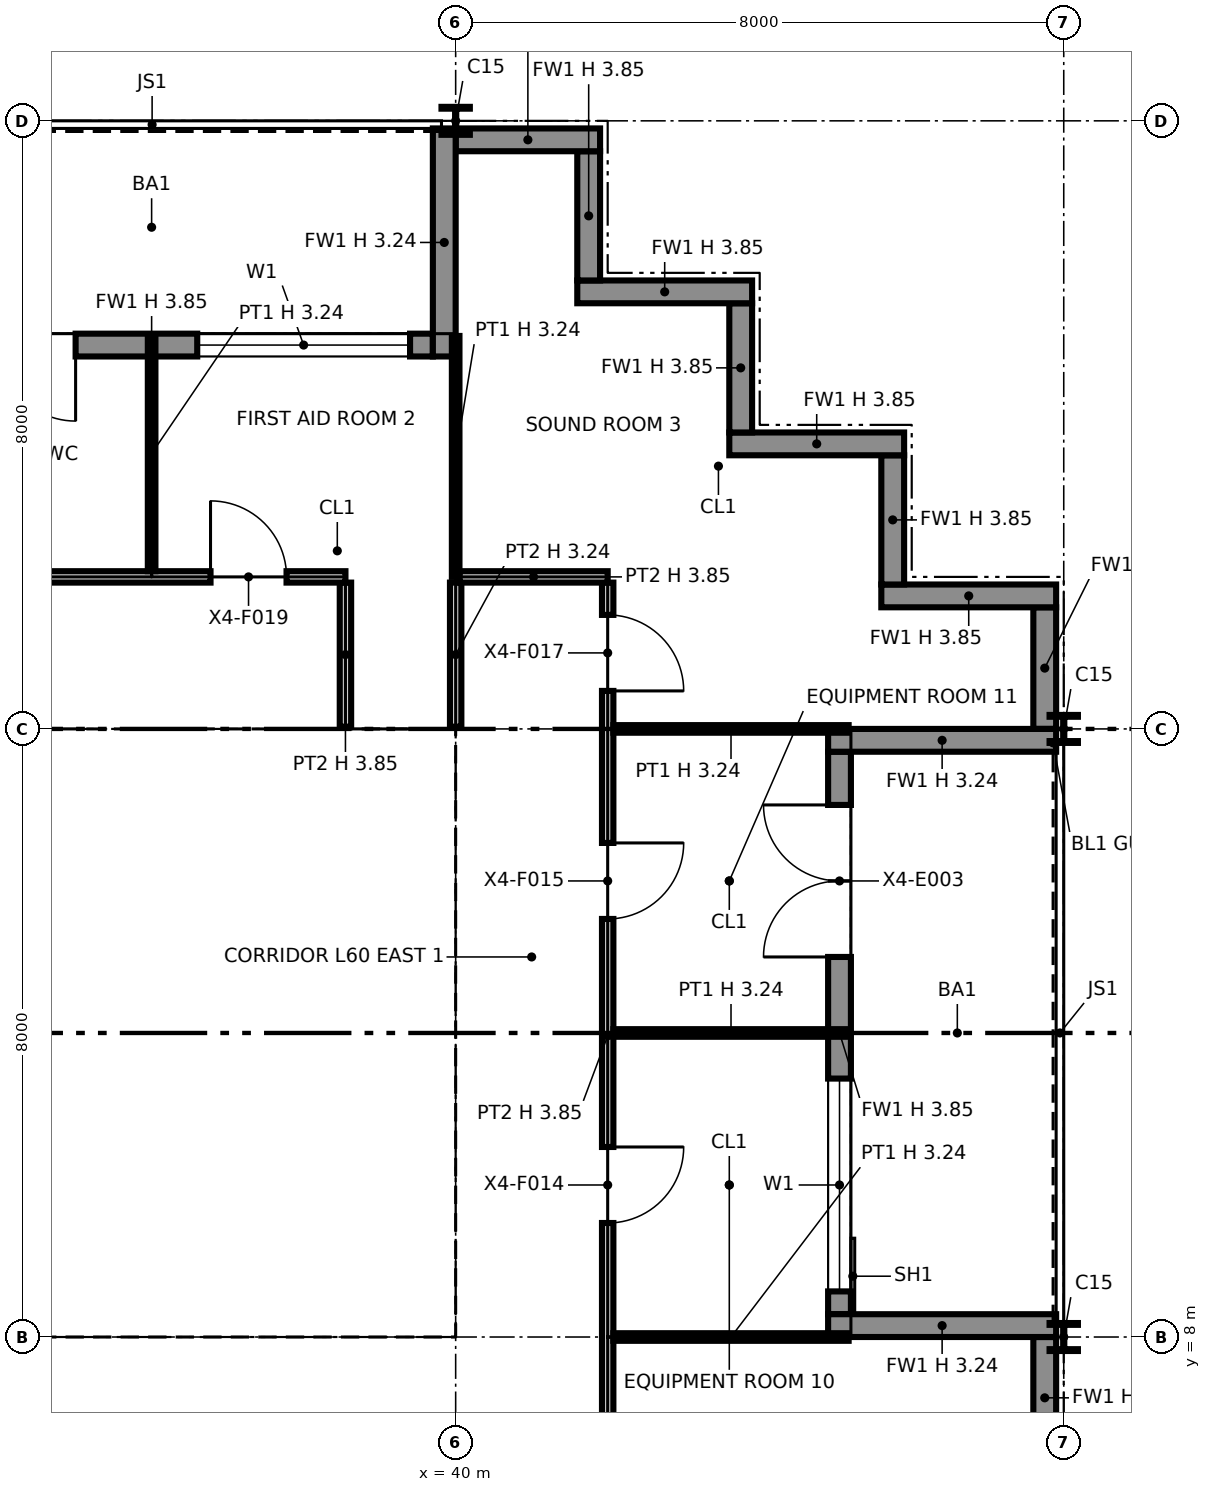
"""IFC4 building model, lengths in metres.
Left out: names, types, materials, properties, quantities, classifications, styles, units other than length and angle.
Written with IfcOpenShell. Run it as: python <this file> out.ifc"""

import sys

from ifc_helpers import new_model, si_unit, direction, frame, frame_2d, origin, origin_2d, place, context, subcontext, project, spatial, polyline, rectangle, i_section, outline, extrude, element, fill, save


model = new_model("IFC4")
c1 = context("Model", 3, precision=1e-05, world=origin(), true_north=direction((0.0, 1.0)))
c2 = subcontext(c1, "Body", "Model", "MODEL_VIEW")
j1 = project(units=[si_unit("LENGTHUNIT", "METRE"), si_unit("PLANEANGLEUNIT", "RADIAN")], contexts=[c1])
p1 = place(None, origin())
s1 = spatial("IfcSite", under=j1, at=p1, CompositionType="ELEMENT")
p2 = place(p1, origin())
s2 = spatial("IfcBuilding", under=s1, at=p2, CompositionType="ELEMENT")
p3 = place(p2, frame((0.0, 0.0, 275.0)))
s3 = spatial("IfcBuildingStorey", under=s2, at=p3, CompositionType="ELEMENT", Elevation=275.0)
for number, where, z_axis, x_axis in (
    (1, (40.0, 8.0, 0.0), (0.0, 0.0, 1.0), (1.0, 0.0, 0.0)),
    (2, (40.0, 16.0, 0.0), (0.0, 0.0, 1.0), (1.0, 0.0, 0.0)),
):
    element("IfcColumn", number, at=place(p3, frame(where, z_axis=z_axis, x_axis=x_axis)), inside=s3, PredefinedType="COLUMN", context=c2, shape_type="SweptSolid", body=[
        extrude(i_section(OverallWidth=0.257, OverallDepth=0.363, WebThickness=0.013, FlangeThickness=0.022, at=origin_2d()), origin(), (0.0, 0.0, 1.0), 3.85),
    ])
for number, where, z_axis, x_axis in (
    (3, (40.0, 24.0, 0.0), (0.0, 0.0, 1.0), (1.0, 0.0, 0.0)),
    (4, (48.0, 8.0, 0.0), (0.0, 0.0, 1.0), (1.0, 0.0, 0.0)),
    (5, (48.0, 16.0, 0.0), (0.0, 0.0, 1.0), (1.0, 0.0, 0.0)),
):
    element("IfcColumn", number, at=place(p3, frame(where, z_axis=z_axis, x_axis=x_axis)), inside=s3, PredefinedType="COLUMN", context=c2, shape_type="SweptSolid", body=[
        extrude(i_section(OverallWidth=0.373, OverallDepth=0.368, WebThickness=0.015, FlangeThickness=0.024, at=origin_2d()), origin(), (0.0, 0.0, 1.0), 3.85),
    ])
p4 = place(p3, frame((47.75, 6.4, 0.0), z_axis=(0.0, 0.0, 1.0), x_axis=(0.0, 1.0, 0.0)))
e6 = element("IfcWall", 6, at=p4, inside=s3, PredefinedType="SOLIDWALL", context=c2, shape_type="SweptSolid", body=[
    extrude(rectangle(XDim=1.6, YDim=0.3, at=frame_2d((0.8, 0.0))), origin(), (0.0, 0.0, 1.0), 3.85),
])
p5 = place(p3, frame((45.05, 8.3, 0.0), z_axis=(0.0, 0.0, 1.0), x_axis=(0.0, 1.0, 0.0)))
e7 = element("IfcWall", 7, at=p5, inside=s3, PredefinedType="SOLIDWALL", context=c2, shape_type="SweptSolid", body=[
    extrude(rectangle(XDim=7.4, YDim=0.3, at=frame_2d((3.7, 0.0))), origin(), (0.0, 0.0, 1.0), 3.85),
])
p6 = place(p5, frame((0.3, 0.0, 0.9)))
e8 = element("IfcOpeningElement", 8, at=p6, cuts=e7, PredefinedType="OPENING", context=c2, shape_type="SweptSolid", body=[
    extrude(rectangle(XDim=2.8, YDim=2.2, at=frame_2d((1.4, 1.1))), frame((0.0, 0.16, 0.0), z_axis=(0.0, -1.0, 0.0), x_axis=(1.0, 0.0, 0.0)), (0.0, 0.0, 1.0), 0.32),
])
p7 = place(p5, frame((4.7, 0.0, 0.0)))
e9 = element("IfcOpeningElement", 9, at=p7, cuts=e7, PredefinedType="OPENING", context=c2, shape_type="SweptSolid", body=[
    extrude(rectangle(XDim=2.0, YDim=2.4, at=frame_2d((1.0, 1.2))), frame((0.0, 0.16, 0.0), z_axis=(0.0, -1.0, 0.0), x_axis=(1.0, 0.0, 0.0)), (0.0, 0.0, 1.0), 0.32),
])
for number, where, z_axis, x_axis in (
    (10, (47.9, 8.15, 0.0), (0.0, 0.0, 1.0), (-1.0, 0.0, 0.0)),
    (11, (47.9, 15.85, 0.0), (0.0, 0.0, 1.0), (-1.0, 0.0, 0.0)),
):
    element("IfcWall", number, at=place(p3, frame(where, z_axis=z_axis, x_axis=x_axis)), inside=s3, PredefinedType="SOLIDWALL", context=c2, shape_type="SweptSolid", body=[
        extrude(rectangle(XDim=3.0, YDim=0.3, at=frame_2d((1.5, 0.0))), origin(), (0.0, 0.0, 1.0), 3.237),
    ])
p8 = place(p3, frame((47.75, 16.0, 0.0), z_axis=(0.0, 0.0, 1.0), x_axis=(0.0, 1.0, 0.0)))
e12 = element("IfcWall", 12, at=p8, inside=s3, PredefinedType="SOLIDWALL", context=c2, shape_type="SweptSolid", body=[
    extrude(rectangle(XDim=1.6, YDim=0.3, at=frame_2d((0.8, 0.0))), origin(), (0.0, 0.0, 1.0), 3.85),
])
p9 = place(p3, frame((47.9, 17.75, 0.0), z_axis=(0.0, 0.0, 1.0), x_axis=(-1.0, 0.0, 0.0)))
e13 = element("IfcWall", 13, at=p9, inside=s3, PredefinedType="SOLIDWALL", context=c2, shape_type="SweptSolid", body=[
    extrude(rectangle(XDim=2.3, YDim=0.3, at=frame_2d((1.15, 0.0))), origin(), (0.0, 0.0, 1.0), 3.85),
])
p10 = place(p3, frame((45.75, 17.9, 0.0), z_axis=(0.0, 0.0, 1.0), x_axis=(0.0, 1.0, 0.0)))
e14 = element("IfcWall", 14, at=p10, inside=s3, PredefinedType="SOLIDWALL", context=c2, shape_type="SweptSolid", body=[
    extrude(rectangle(XDim=1.7, YDim=0.3, at=frame_2d((0.85, 0.0))), origin(), (0.0, 0.0, 1.0), 3.85),
])
p11 = place(p3, frame((45.9, 19.75, 0.0), z_axis=(0.0, 0.0, 1.0), x_axis=(-1.0, 0.0, 0.0)))
e15 = element("IfcWall", 15, at=p11, inside=s3, PredefinedType="SOLIDWALL", context=c2, shape_type="SweptSolid", body=[
    extrude(rectangle(XDim=2.3, YDim=0.3, at=frame_2d((1.15, 0.0))), origin(), (0.0, 0.0, 1.0), 3.85),
])
p12 = place(p3, frame((43.75, 19.9, 0.0), z_axis=(0.0, 0.0, 1.0), x_axis=(0.0, 1.0, 0.0)))
e16 = element("IfcWall", 16, at=p12, inside=s3, PredefinedType="SOLIDWALL", context=c2, shape_type="SweptSolid", body=[
    extrude(rectangle(XDim=1.7, YDim=0.3, at=frame_2d((0.85, 0.0))), origin(), (0.0, 0.0, 1.0), 3.85),
])
p13 = place(p3, frame((43.9, 21.75, 0.0), z_axis=(0.0, 0.0, 1.0), x_axis=(-1.0, 0.0, 0.0)))
e17 = element("IfcWall", 17, at=p13, inside=s3, PredefinedType="SOLIDWALL", context=c2, shape_type="SweptSolid", body=[
    extrude(rectangle(XDim=2.3, YDim=0.3, at=frame_2d((1.15, 0.0))), origin(), (0.0, 0.0, 1.0), 3.85),
])
p14 = place(p3, frame((41.75, 21.9, 0.0), z_axis=(0.0, 0.0, 1.0), x_axis=(0.0, 1.0, 0.0)))
e18 = element("IfcWall", 18, at=p14, inside=s3, PredefinedType="SOLIDWALL", context=c2, shape_type="SweptSolid", body=[
    extrude(rectangle(XDim=1.7, YDim=0.3, at=frame_2d((0.85, 0.0))), origin(), (0.0, 0.0, 1.0), 3.85),
])
p15 = place(p3, frame((41.9, 23.75, 0.0), z_axis=(0.0, 0.0, 1.0), x_axis=(-1.0, 0.0, 0.0)))
e19 = element("IfcWall", 19, at=p15, inside=s3, PredefinedType="SOLIDWALL", context=c2, shape_type="SweptSolid", body=[
    extrude(rectangle(XDim=1.9, YDim=0.3, at=frame_2d((0.95, 0.0))), origin(), (0.0, 0.0, 1.0), 3.85),
])
p16 = place(p3, frame((39.7, 21.05, 0.0), z_axis=(0.0, 0.0, 1.0), x_axis=(-1.0, 0.0, 0.0)))
e20 = element("IfcWall", 20, at=p16, inside=s3, PredefinedType="SOLIDWALL", context=c2, shape_type="SweptSolid", body=[
    extrude(rectangle(XDim=7.4, YDim=0.3, at=frame_2d((3.7, 0.0))), origin(), (0.0, 0.0, 1.0), 3.85),
])
p17 = place(p16, frame((0.3, 0.0, 0.9)))
e21 = element("IfcOpeningElement", 21, at=p17, cuts=e20, PredefinedType="OPENING", context=c2, shape_type="SweptSolid", body=[
    extrude(rectangle(XDim=2.8, YDim=2.2, at=frame_2d((1.4, 1.1))), frame((0.0, 0.16, 0.0), z_axis=(0.0, -1.0, 0.0), x_axis=(1.0, 0.0, 0.0)), (0.0, 0.0, 1.0), 0.32),
])
p18 = place(p16, frame((4.7, 0.0, 0.0)))
e22 = element("IfcOpeningElement", 22, at=p18, cuts=e20, PredefinedType="OPENING", context=c2, shape_type="SweptSolid", body=[
    extrude(rectangle(XDim=2.0, YDim=2.4, at=frame_2d((1.0, 1.2))), frame((0.0, 0.16, 0.0), z_axis=(0.0, -1.0, 0.0), x_axis=(1.0, 0.0, 0.0)), (0.0, 0.0, 1.0), 0.32),
])
p19 = place(p3, frame((39.85, 23.9, 0.0), z_axis=(0.0, 0.0, 1.0), x_axis=(0.0, -1.0, 0.0)))
e23 = element("IfcWall", 23, at=p19, inside=s3, PredefinedType="SOLIDWALL", context=c2, shape_type="SweptSolid", body=[
    extrude(rectangle(XDim=3.0, YDim=0.3, at=frame_2d((1.5, 0.0))), origin(), (0.0, 0.0, 1.0), 3.237),
])
p20 = place(p3, frame((24.65, 8.75, 0.0), z_axis=(0.0, 0.0, 1.0), x_axis=(1.0, 0.0, 0.0)))
e24 = element("IfcWall", 24, at=p20, inside=s3, PredefinedType="PARTITIONING", context=c2, shape_type="SweptSolid", body=[
    extrude(outline(polyline([(0.0, 0.0), (14.7, 0.0), (14.7, 3.85), (7.438, 3.85), (7.437, 3.318), (7.263, 3.318), (7.262, 3.85), (0.0, 3.85), (0.0, 0.0)])), frame((0.0, 0.1, 0.0), z_axis=(0.0, -1.0, 0.0), x_axis=(1.0, 0.0, 0.0)), (0.0, 0.0, 1.0), 0.2),
])
p21 = place(p3, frame((24.65, 15.25, 0.0), z_axis=(0.0, 0.0, 1.0), x_axis=(1.0, 0.0, 0.0)))
e25 = element("IfcWall", 25, at=p21, inside=s3, PredefinedType="PARTITIONING", context=c2, shape_type="SweptSolid", body=[
    extrude(outline(polyline([(0.0, 0.0), (14.7, 0.0), (14.7, 3.85), (7.438, 3.85), (7.437, 3.318), (7.263, 3.318), (7.262, 3.85), (0.0, 3.85), (0.0, 0.0)])), frame((0.0, 0.1, 0.0), z_axis=(0.0, -1.0, 0.0), x_axis=(1.0, 0.0, 0.0)), (0.0, 0.0, 1.0), 0.2),
])
p22 = place(p21, frame((2.85, 0.0, 0.0)))
e26 = element("IfcOpeningElement", 26, at=p22, cuts=e25, PredefinedType="OPENING", context=c2, shape_type="SweptSolid", body=[
    extrude(rectangle(XDim=1.8, YDim=2.1, at=frame_2d((0.9, 1.05))), frame((0.0, 0.11, 0.0), z_axis=(0.0, -1.0, 0.0), x_axis=(1.0, 0.0, 0.0)), (0.0, 0.0, 1.0), 0.22),
])
p23 = place(p21, frame((9.95, 0.0, 0.0), z_axis=(0.0, 0.0, 1.0), x_axis=(-1.0, 0.0, 0.0)))
e27 = element("IfcOpeningElement", 27, at=p23, cuts=e25, PredefinedType="OPENING", context=c2, shape_type="SweptSolid", body=[
    extrude(rectangle(XDim=1.4, YDim=2.1, at=frame_2d((0.7, 1.05))), frame((0.0, 0.11, 0.0), z_axis=(0.0, -1.0, 0.0), x_axis=(1.0, 0.0, 0.0)), (0.0, 0.0, 1.0), 0.22),
])
p24 = place(p21, frame((13.4, 0.0, 0.0), z_axis=(0.0, 0.0, 1.0), x_axis=(-1.0, 0.0, 0.0)))
e28 = element("IfcOpeningElement", 28, at=p24, cuts=e25, PredefinedType="OPENING", context=c2, shape_type="SweptSolid", body=[
    extrude(rectangle(XDim=1.4, YDim=2.1, at=frame_2d((0.7, 1.05))), frame((0.0, 0.11, 0.0), z_axis=(0.0, -1.0, 0.0), x_axis=(1.0, 0.0, 0.0)), (0.0, 0.0, 1.0), 0.22),
])
for number, where, z_axis, x_axis in (
    (29, (35.6, 8.85, 0.0), (0.0, 0.0, 1.0), (0.0, 1.0, 0.0)),
    (30, (39.25, 8.85, 0.0), (0.0, 0.0, 1.0), (0.0, 1.0, 0.0)),
):
    element("IfcWall", number, at=place(p3, frame(where, z_axis=z_axis, x_axis=x_axis)), inside=s3, PredefinedType="PARTITIONING", context=c2, shape_type="SweptSolid", body=[
        extrude(rectangle(XDim=6.3, YDim=0.2, at=frame_2d((3.15, 0.0))), origin(), (0.0, 0.0, 1.0), 3.85),
    ])
p25 = place(p3, frame((42.0, 6.0, 0.0), z_axis=(0.0, 0.0, 1.0), x_axis=(0.0, 1.0, 0.0)))
e31 = element("IfcWall", 31, at=p25, inside=s3, PredefinedType="PARTITIONING", context=c2, shape_type="SweptSolid", body=[
    extrude(outline(polyline([(0.0, 0.0), (11.925, 0.0), (11.925, 3.85), (10.3, 3.85), (10.298, 3.238), (9.702, 3.238), (9.7, 3.85), (6.3, 3.85), (6.298, 3.238), (5.702, 3.238), (5.7, 3.85), (2.3, 3.85), (2.298, 3.238), (1.702, 3.238), (1.7, 3.85), (0.0, 3.85), (0.0, 0.0)])), frame((0.0, 0.075, 0.0), z_axis=(0.0, -1.0, 0.0), x_axis=(1.0, 0.0, 0.0)), (0.0, 0.0, 1.0), 0.15),
])
p26 = place(p25, frame((4.5, 0.0, 0.0), z_axis=(0.0, 0.0, 1.0), x_axis=(-1.0, 0.0, 0.0)))
e32 = element("IfcOpeningElement", 32, at=p26, cuts=e31, PredefinedType="OPENING", context=c2, shape_type="SweptSolid", body=[
    extrude(rectangle(XDim=1.0, YDim=2.1, at=frame_2d((0.5, 1.05))), frame((0.0, 0.085, 0.0), z_axis=(0.0, -1.0, 0.0), x_axis=(1.0, 0.0, 0.0)), (0.0, 0.0, 1.0), 0.17),
])
p27 = place(p25, frame((8.5, 0.0, 0.0), z_axis=(0.0, 0.0, 1.0), x_axis=(-1.0, 0.0, 0.0)))
e33 = element("IfcOpeningElement", 33, at=p27, cuts=e31, PredefinedType="OPENING", context=c2, shape_type="SweptSolid", body=[
    extrude(rectangle(XDim=1.0, YDim=2.1, at=frame_2d((0.5, 1.05))), frame((0.0, 0.085, 0.0), z_axis=(0.0, -1.0, 0.0), x_axis=(1.0, 0.0, 0.0)), (0.0, 0.0, 1.0), 0.17),
])
p28 = place(p25, frame((11.5, 0.0, 0.0), z_axis=(0.0, 0.0, 1.0), x_axis=(-1.0, 0.0, 0.0)))
e34 = element("IfcOpeningElement", 34, at=p28, cuts=e31, PredefinedType="OPENING", context=c2, shape_type="SweptSolid", body=[
    extrude(rectangle(XDim=1.0, YDim=2.1, at=frame_2d((0.5, 1.05))), frame((0.0, 0.085, 0.0), z_axis=(0.0, -1.0, 0.0), x_axis=(1.0, 0.0, 0.0)), (0.0, 0.0, 1.0), 0.17),
])
for number, where, z_axis, x_axis in (
    (35, (42.075, 8.0, 0.0), (0.0, 0.0, 1.0), (1.0, 0.0, 0.0)),
    (36, (42.075, 12.0, 0.0), (0.0, 0.0, 1.0), (1.0, 0.0, 0.0)),
    (37, (42.075, 16.0, 0.0), (0.0, 0.0, 1.0), (1.0, 0.0, 0.0)),
):
    element("IfcWall", number, at=place(p3, frame(where, z_axis=z_axis, x_axis=x_axis)), inside=s3, PredefinedType="PARTITIONING", context=c2, shape_type="SweptSolid", body=[
        extrude(rectangle(XDim=3.095, YDim=0.1, at=frame_2d((1.547, 0.0))), origin(), (0.0, 0.0, 1.0), 3.238),
    ])
p29 = place(p3, frame((38.55, 16.03, 0.0), z_axis=(0.0, 0.0, 1.0), x_axis=(0.0, 1.0, 0.0)))
e38 = element("IfcWall", 38, at=p29, inside=s3, PredefinedType="PARTITIONING", context=c2, shape_type="SweptSolid", body=[
    extrude(rectangle(XDim=1.895, YDim=0.15, at=frame_2d((0.948, 0.0))), origin(), (0.0, 0.0, 1.0), 3.85),
])
p30 = place(p3, frame((40.0, 16.03, 0.0), z_axis=(0.0, 0.0, 1.0), x_axis=(0.0, 1.0, 0.0)))
e39 = element("IfcWall", 39, at=p30, inside=s3, PredefinedType="PARTITIONING", context=c2, shape_type="SweptSolid", body=[
    extrude(rectangle(XDim=1.895, YDim=0.15, at=frame_2d((0.948, 0.0))), origin(), (0.0, 0.0, 1.0), 3.238),
])
p31 = place(p3, frame((26.075, 18.0, 0.0), z_axis=(0.0, 0.0, 1.0), x_axis=(1.0, 0.0, 0.0)))
e40 = element("IfcWall", 40, at=p31, inside=s3, PredefinedType="PARTITIONING", context=c2, shape_type="SweptSolid", body=[
    extrude(rectangle(XDim=12.475, YDim=0.15, at=frame_2d((6.238, 0.0))), origin(), (0.0, 0.0, 1.0), 3.85),
])
p32 = place(p31, frame((7.425, 0.0, 0.0)))
e41 = element("IfcOpeningElement", 41, at=p32, cuts=e40, PredefinedType="OPENING", context=c2, shape_type="SweptSolid", body=[
    extrude(rectangle(XDim=1.0, YDim=2.1, at=frame_2d((0.5, 1.05))), frame((0.0, 0.085, 0.0), z_axis=(0.0, -1.0, 0.0), x_axis=(1.0, 0.0, 0.0)), (0.0, 0.0, 1.0), 0.17),
])
p33 = place(p31, frame((10.7, 0.0, 0.0)))
e42 = element("IfcOpeningElement", 42, at=p33, cuts=e40, PredefinedType="OPENING", context=c2, shape_type="SweptSolid", body=[
    extrude(rectangle(XDim=1.0, YDim=2.1, at=frame_2d((0.5, 1.05))), frame((0.0, 0.085, 0.0), z_axis=(0.0, -1.0, 0.0), x_axis=(1.0, 0.0, 0.0)), (0.0, 0.0, 1.0), 0.17),
])
p34 = place(p31, frame((3.425, 0.0, 0.0)))
e43 = element("IfcOpeningElement", 43, at=p34, cuts=e40, PredefinedType="OPENING", context=c2, shape_type="SweptSolid", body=[
    extrude(rectangle(XDim=1.0, YDim=2.1, at=frame_2d((0.5, 1.05))), frame((0.0, 0.085, 0.0), z_axis=(0.0, -1.0, 0.0), x_axis=(1.0, 0.0, 0.0)), (0.0, 0.0, 1.0), 0.17),
])
p35 = place(p3, frame((36.0, 18.075, 0.0), z_axis=(0.0, 0.0, 1.0), x_axis=(0.0, 1.0, 0.0)))
e44 = element("IfcWall", 44, at=p35, inside=s3, PredefinedType="PARTITIONING", context=c2, shape_type="SweptSolid", body=[
    extrude(rectangle(XDim=3.095, YDim=0.1, at=frame_2d((1.547, 0.0))), origin(), (0.0, 0.0, 1.0), 3.238),
])
p36 = place(p3, frame((40.05, 18.0, 0.0), z_axis=(0.0, 0.0, 1.0), x_axis=(1.0, 0.0, 0.0)))
e45 = element("IfcWall", 45, at=p36, inside=s3, PredefinedType="PARTITIONING", context=c2, shape_type="SweptSolid", body=[
    extrude(rectangle(XDim=1.95, YDim=0.15, at=frame_2d((0.975, 0.0))), origin(), (0.0, 0.0, 1.0), 3.85),
])
p37 = place(p3, frame((40.0, 18.0, 0.0), z_axis=(0.0, 0.0, 1.0), x_axis=(0.0, 1.0, 0.0)))
e46 = element("IfcWall", 46, at=p37, inside=s3, PredefinedType="PARTITIONING", context=c2, shape_type="SweptSolid", body=[
    extrude(rectangle(XDim=3.17, YDim=0.1, at=frame_2d((1.585, 0.0))), origin(), (0.0, 0.0, 1.0), 3.238),
])
p38 = place(p6, origin())
e47 = element("IfcWindow", 47, at=p38, inside=s3, PartitioningType="SINGLE_PANEL", PredefinedType="WINDOW", context=c2, shape_type="SweptSolid", body=[
    extrude(rectangle(XDim=2.8, YDim=2.2, at=frame_2d((1.4, 1.1))), frame((0.0, 0.03, 0.0), z_axis=(0.0, -1.0, 0.0), x_axis=(1.0, 0.0, 0.0)), (0.0, 0.0, 1.0), 0.06),
])
fill(e8, e47)
p39 = place(p7, origin())
e48 = element("IfcDoor", 48, at=p39, inside=s3, OperationType="DOUBLE_DOOR_SINGLE_SWING", PredefinedType="DOOR", context=c2, shape_type="SweptSolid", body=[
    extrude(rectangle(XDim=2.0, YDim=2.4, at=frame_2d((1.0, 1.2))), frame((0.0, 0.025, 0.0), z_axis=(0.0, -1.0, 0.0), x_axis=(1.0, 0.0, 0.0)), (0.0, 0.0, 1.0), 0.05),
])
fill(e9, e48)
p40 = place(p17, origin())
e49 = element("IfcWindow", 49, at=p40, inside=s3, PartitioningType="SINGLE_PANEL", PredefinedType="WINDOW", context=c2, shape_type="SweptSolid", body=[
    extrude(rectangle(XDim=2.8, YDim=2.2, at=frame_2d((1.4, 1.1))), frame((0.0, 0.03, 0.0), z_axis=(0.0, -1.0, 0.0), x_axis=(1.0, 0.0, 0.0)), (0.0, 0.0, 1.0), 0.06),
])
fill(e21, e49)
p41 = place(p18, origin())
e50 = element("IfcDoor", 50, at=p41, inside=s3, OperationType="DOUBLE_DOOR_SINGLE_SWING", PredefinedType="DOOR", context=c2, shape_type="SweptSolid", body=[
    extrude(rectangle(XDim=2.0, YDim=2.4, at=frame_2d((1.0, 1.2))), frame((0.0, 0.025, 0.0), z_axis=(0.0, -1.0, 0.0), x_axis=(1.0, 0.0, 0.0)), (0.0, 0.0, 1.0), 0.05),
])
fill(e22, e50)
p42 = place(p24, origin())
e51 = element("IfcDoor", 51, at=p42, inside=s3, OperationType="DOUBLE_DOOR_SINGLE_SWING", PredefinedType="NOTDEFINED", context=c2, shape_type="SweptSolid", body=[
    extrude(rectangle(XDim=1.4, YDim=2.1, at=frame_2d((0.7, 1.05))), frame((0.0, 0.025, 0.0), z_axis=(0.0, -1.0, 0.0), x_axis=(1.0, 0.0, 0.0)), (0.0, 0.0, 1.0), 0.05),
])
fill(e28, e51)
p43 = place(p26, origin())
e52 = element("IfcDoor", 52, at=p43, inside=s3, OperationType="SINGLE_SWING_LEFT", PredefinedType="DOOR", context=c2, shape_type="SweptSolid", body=[
    extrude(rectangle(XDim=1.0, YDim=2.1, at=frame_2d((0.5, 1.05))), frame((0.0, 0.025, 0.0), z_axis=(0.0, -1.0, 0.0), x_axis=(1.0, 0.0, 0.0)), (0.0, 0.0, 1.0), 0.05),
])
fill(e32, e52)
p44 = place(p27, origin())
e53 = element("IfcDoor", 53, at=p44, inside=s3, OperationType="SINGLE_SWING_LEFT", PredefinedType="DOOR", context=c2, shape_type="SweptSolid", body=[
    extrude(rectangle(XDim=1.0, YDim=2.1, at=frame_2d((0.5, 1.05))), frame((0.0, 0.025, 0.0), z_axis=(0.0, -1.0, 0.0), x_axis=(1.0, 0.0, 0.0)), (0.0, 0.0, 1.0), 0.05),
])
fill(e33, e53)
p45 = place(p28, origin())
e54 = element("IfcDoor", 54, at=p45, inside=s3, OperationType="SINGLE_SWING_RIGHT", PredefinedType="DOOR", context=c2, shape_type="SweptSolid", body=[
    extrude(rectangle(XDim=1.0, YDim=2.1, at=frame_2d((0.5, 1.05))), frame((0.0, 0.025, 0.0), z_axis=(0.0, -1.0, 0.0), x_axis=(1.0, 0.0, 0.0)), (0.0, 0.0, 1.0), 0.05),
])
fill(e34, e54)
p46 = place(p33, origin())
e55 = element("IfcDoor", 55, at=p46, inside=s3, OperationType="SINGLE_SWING_LEFT", PredefinedType="DOOR", context=c2, shape_type="SweptSolid", body=[
    extrude(rectangle(XDim=1.0, YDim=2.1, at=frame_2d((0.5, 1.05))), frame((0.0, 0.025, 0.0), z_axis=(0.0, -1.0, 0.0), x_axis=(1.0, 0.0, 0.0)), (0.0, 0.0, 1.0), 0.05),
])
fill(e42, e55)
save(model, sys.argv[1])
